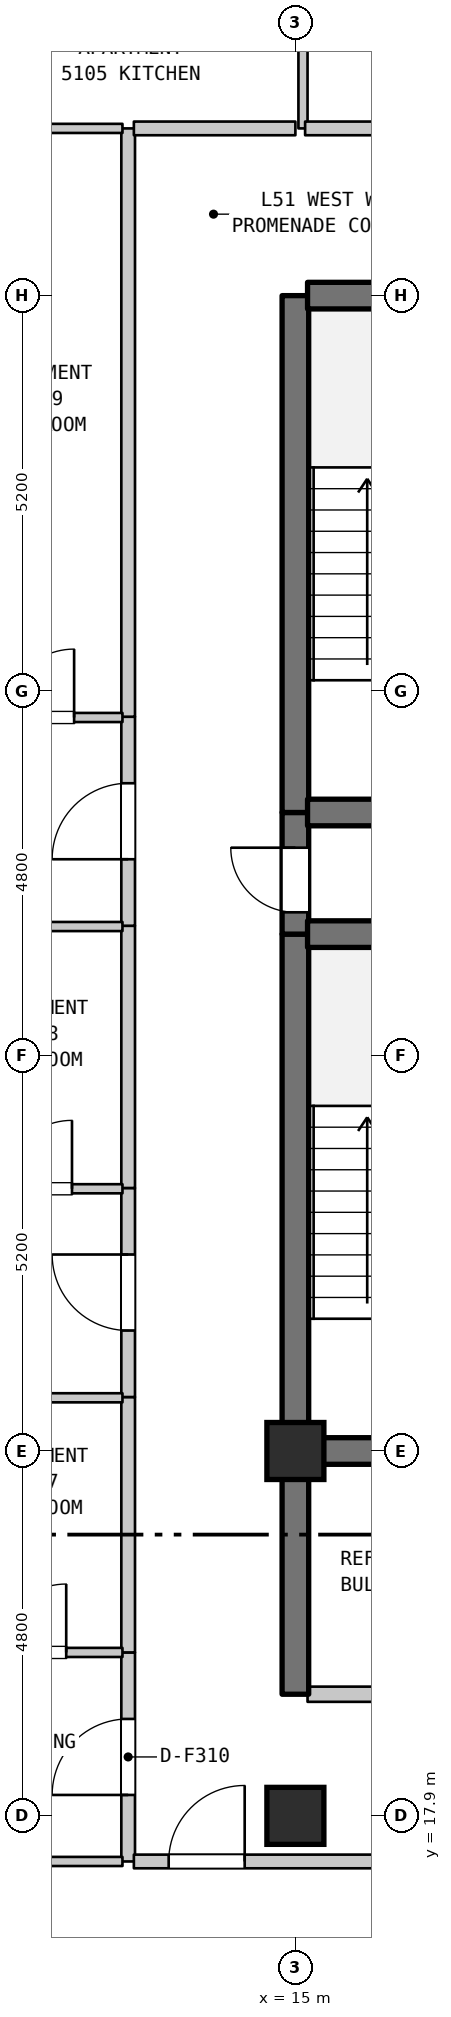
"""IFC4 building model, lengths in metres.
Left out: names, types, materials, properties, quantities, classifications, styles, units other than length and angle.
Written with IfcOpenShell. Run it as: python <this file> out.ifc"""

import sys

from ifc_helpers import new_model, si_unit, direction, frame, frame_2d, origin, origin_2d, place, context, subcontext, project, spatial, rectangle, extrude, element, fill, save


model = new_model("IFC4")
c1 = context("Model", 3, precision=1e-05, world=origin(), true_north=direction((0.0, 1.0)))
c2 = subcontext(c1, "Body", "Model", "MODEL_VIEW")
j1 = project(units=[si_unit("LENGTHUNIT", "METRE"), si_unit("PLANEANGLEUNIT", "RADIAN")], contexts=[c1])
p1 = place(None, origin())
s1 = spatial("IfcSite", under=j1, at=p1, CompositionType="ELEMENT")
p2 = place(p1, origin())
s2 = spatial("IfcBuilding", under=s1, at=p2, CompositionType="ELEMENT")
p3 = place(p2, frame((0.0, 0.0, 206.9)))
s3 = spatial("IfcBuildingStorey", under=s2, at=p3, CompositionType="ELEMENT", Elevation=206.9)
for number, where, z_axis, x_axis in (
    (1, (15.0, 17.9, 0.0), (0.0, 0.0, 1.0), (1.0, 0.0, 0.0)),
    (2, (15.0, 22.7, 0.0), (0.0, 0.0, 1.0), (1.0, 0.0, 0.0)),
):
    element("IfcColumn", number, at=place(p3, frame(where, z_axis=z_axis, x_axis=x_axis)), inside=s3, PredefinedType="COLUMN", context=c2, shape_type="SweptSolid", body=[
        extrude(rectangle(XDim=0.75, YDim=0.75, at=origin_2d()), origin(), (0.0, 0.0, 1.0), 3.7),
    ])
p4 = place(p3, frame((12.8, 17.3, 0.0), z_axis=(0.0, 0.0, 1.0), x_axis=(0.0, 1.0, 0.0)))
e3 = element("IfcWall", 3, at=p4, inside=s3, PredefinedType="STANDARD", context=c2, shape_type="SweptSolid", body=[
    extrude(rectangle(XDim=2.75, YDim=0.18, at=frame_2d((1.375, 0.0))), origin(), (0.0, 0.0, 1.0), 3.39),
])
p5 = place(p4, frame((0.875, 0.0, 0.0)))
e4 = element("IfcOpeningElement", 4, at=p5, cuts=e3, PredefinedType="OPENING", context=c2, shape_type="SweptSolid", body=[
    extrude(rectangle(XDim=1.0, YDim=2.15, at=frame_2d((0.5, 1.075))), frame((0.0, 0.1, 0.0), z_axis=(0.0, -1.0, 0.0), x_axis=(1.0, 0.0, 0.0)), (0.0, 0.0, 1.0), 0.2),
])
p6 = place(p3, frame((12.8, 20.05, 0.0), z_axis=(0.0, 0.0, 1.0), x_axis=(0.0, 1.0, 0.0)))
e5 = element("IfcWall", 5, at=p6, inside=s3, PredefinedType="STANDARD", context=c2, shape_type="SweptSolid", body=[
    extrude(rectangle(XDim=3.36, YDim=0.18, at=frame_2d((1.68, 0.0))), origin(), (0.0, 0.0, 1.0), 3.39),
])
p7 = place(p3, frame((12.8, 23.41, 0.0), z_axis=(0.0, 0.0, 1.0), x_axis=(0.0, 1.0, 0.0)))
e6 = element("IfcWall", 6, at=p7, inside=s3, PredefinedType="STANDARD", context=c2, shape_type="SweptSolid", body=[
    extrude(rectangle(XDim=2.75, YDim=0.18, at=frame_2d((1.375, 0.0))), origin(), (0.0, 0.0, 1.0), 3.39),
])
p8 = place(p7, frame((0.875, 0.0, 0.0)))
e7 = element("IfcOpeningElement", 7, at=p8, cuts=e6, PredefinedType="OPENING", context=c2, shape_type="SweptSolid", body=[
    extrude(rectangle(XDim=1.0, YDim=2.15, at=frame_2d((0.5, 1.075))), frame((0.0, 0.1, 0.0), z_axis=(0.0, -1.0, 0.0), x_axis=(1.0, 0.0, 0.0)), (0.0, 0.0, 1.0), 0.2),
])
p9 = place(p3, frame((12.8, 26.16, 0.0), z_axis=(0.0, 0.0, 1.0), x_axis=(0.0, 1.0, 0.0)))
e8 = element("IfcWall", 8, at=p9, inside=s3, PredefinedType="STANDARD", context=c2, shape_type="SweptSolid", body=[
    extrude(rectangle(XDim=3.45, YDim=0.18, at=frame_2d((1.725, 0.0))), origin(), (0.0, 0.0, 1.0), 3.39),
])
p10 = place(p3, frame((12.8, 29.61, 0.0), z_axis=(0.0, 0.0, 1.0), x_axis=(0.0, 1.0, 0.0)))
e9 = element("IfcWall", 9, at=p10, inside=s3, PredefinedType="STANDARD", context=c2, shape_type="SweptSolid", body=[
    extrude(rectangle(XDim=2.75, YDim=0.18, at=frame_2d((1.375, 0.0))), origin(), (0.0, 0.0, 1.0), 3.39),
])
p11 = place(p10, frame((0.875, 0.0, 0.0)))
e10 = element("IfcOpeningElement", 10, at=p11, cuts=e9, PredefinedType="OPENING", context=c2, shape_type="SweptSolid", body=[
    extrude(rectangle(XDim=1.0, YDim=2.15, at=frame_2d((0.5, 1.075))), frame((0.0, 0.1, 0.0), z_axis=(0.0, -1.0, 0.0), x_axis=(1.0, 0.0, 0.0)), (0.0, 0.0, 1.0), 0.2),
])
p12 = place(p3, frame((12.8, 32.36, 0.0), z_axis=(0.0, 0.0, 1.0), x_axis=(0.0, 1.0, 0.0)))
e11 = element("IfcWall", 11, at=p12, inside=s3, PredefinedType="STANDARD", context=c2, shape_type="SweptSolid", body=[
    extrude(rectangle(XDim=7.74, YDim=0.18, at=frame_2d((3.87, 0.0))), origin(), (0.0, 0.0, 1.0), 3.39),
])
p13 = place(p3, frame((15.0, 19.5, 0.0), z_axis=(0.0, 0.0, 1.0), x_axis=(0.0, 1.0, 0.0)))
e12 = element("IfcWall", 12, at=p13, inside=s3, PredefinedType="SHEAR", context=c2, shape_type="SweptSolid", body=[
    extrude(rectangle(XDim=3.2, YDim=0.35, at=frame_2d((1.6, 0.0))), origin(), (0.0, 0.0, 1.0), 3.39),
])
p14 = place(p3, frame((15.0, 22.7, 0.0), z_axis=(0.0, 0.0, 1.0), x_axis=(0.0, 1.0, 0.0)))
e13 = element("IfcWall", 13, at=p14, inside=s3, PredefinedType="SHEAR", context=c2, shape_type="SweptSolid", body=[
    extrude(rectangle(XDim=6.8, YDim=0.35, at=frame_2d((3.4, 0.0))), origin(), (0.0, 0.0, 1.0), 3.39),
])
p15 = place(p3, frame((15.0, 29.5, 0.0), z_axis=(0.0, 0.0, 1.0), x_axis=(0.0, 1.0, 0.0)))
e14 = element("IfcWall", 14, at=p15, inside=s3, PredefinedType="SHEAR", context=c2, shape_type="SweptSolid", body=[
    extrude(rectangle(XDim=1.6, YDim=0.35, at=frame_2d((0.8, 0.0))), origin(), (0.0, 0.0, 1.0), 3.39),
])
p16 = place(p15, frame((0.287, 0.0, 0.0)))
e15 = element("IfcOpeningElement", 15, at=p16, cuts=e14, PredefinedType="OPENING", context=c2, shape_type="SweptSolid", body=[
    extrude(rectangle(XDim=0.85, YDim=2.1, at=frame_2d((0.425, 1.05))), frame((0.0, 0.185, 0.0), z_axis=(0.0, -1.0, 0.0), x_axis=(1.0, 0.0, 0.0)), (0.0, 0.0, 1.0), 0.37),
])
p17 = place(p3, frame((15.0, 31.1, 0.0), z_axis=(0.0, 0.0, 1.0), x_axis=(0.0, 1.0, 0.0)))
e16 = element("IfcWall", 16, at=p17, inside=s3, PredefinedType="SHEAR", context=c2, shape_type="SweptSolid", body=[
    extrude(rectangle(XDim=6.8, YDim=0.35, at=frame_2d((3.4, 0.0))), origin(), (0.0, 0.0, 1.0), 3.39),
])
p18 = place(p3, frame((15.1, 40.1, 0.0), z_axis=(0.0, 0.0, 1.0), x_axis=(0.0, 1.0, 0.0)))
e17 = element("IfcWall", 17, at=p18, inside=s3, PredefinedType="PARTITIONING", context=c2, shape_type="SweptSolid", body=[
    extrude(rectangle(XDim=2.3, YDim=0.12, at=frame_2d((1.15, 0.0))), origin(), (0.0, 0.0, 1.0), 3.39),
])
p19 = place(p3, frame((9.085, 17.3, 0.0), z_axis=(0.0, 0.0, 1.0), x_axis=(1.0, 0.0, 0.0)))
e18 = element("IfcWall", 18, at=p19, inside=s3, PredefinedType="PARTITIONING", context=c2, shape_type="SweptSolid", body=[
    extrude(rectangle(XDim=3.64, YDim=0.12, at=frame_2d((1.82, 0.0))), origin(), (0.0, 0.0, 1.0), 3.39),
])
p20 = place(p3, frame((12.875, 17.3, 0.0), z_axis=(0.0, 0.0, 1.0), x_axis=(1.0, 0.0, 0.0)))
e19 = element("IfcWall", 19, at=p20, inside=s3, PredefinedType="STANDARD", context=c2, shape_type="SweptSolid", body=[
    extrude(rectangle(XDim=3.78, YDim=0.18, at=frame_2d((1.89, 0.0))), origin(), (0.0, 0.0, 1.0), 3.39),
])
p21 = place(p20, frame((0.458, 0.0, 0.0)))
e20 = element("IfcOpeningElement", 20, at=p21, cuts=e19, PredefinedType="OPENING", context=c2, shape_type="SweptSolid", body=[
    extrude(rectangle(XDim=1.0, YDim=2.15, at=frame_2d((0.5, 1.075))), frame((0.0, 0.1, 0.0), z_axis=(0.0, -1.0, 0.0), x_axis=(1.0, 0.0, 0.0)), (0.0, 0.0, 1.0), 0.2),
])
p22 = place(p3, frame((15.16, 19.5, 0.0), z_axis=(0.0, 0.0, 1.0), x_axis=(1.0, 0.0, 0.0)))
e21 = element("IfcWall", 21, at=p22, inside=s3, PredefinedType="STANDARD", context=c2, shape_type="SweptSolid", body=[
    extrude(rectangle(XDim=3.68, YDim=0.2, at=frame_2d((1.84, 0.0))), origin(), (0.0, 0.0, 1.0), 3.39),
])
p23 = place(p22, frame((1.39, 0.0, 0.0)))
e22 = element("IfcOpeningElement", 22, at=p23, cuts=e21, PredefinedType="OPENING", context=c2, shape_type="SweptSolid", body=[
    extrude(rectangle(XDim=0.9, YDim=2.15, at=frame_2d((0.45, 1.075))), frame((0.0, 0.11, 0.0), z_axis=(0.0, -1.0, 0.0), x_axis=(1.0, 0.0, 0.0)), (0.0, 0.0, 1.0), 0.22),
])
p24 = place(p3, frame((10.456, 20.05, 0.0), z_axis=(0.0, 0.0, 1.0), x_axis=(1.0, 0.0, 0.0)))
e23 = element("IfcWall", 23, at=p24, inside=s3, PredefinedType="PARTITIONING", context=c2, shape_type="SweptSolid", body=[
    extrude(rectangle(XDim=2.269, YDim=0.12, at=frame_2d((1.135, 0.0))), origin(), (0.0, 0.0, 1.0), 3.39),
])
p25 = place(p24, frame((0.629, 0.0, 0.0)))
e24 = element("IfcOpeningElement", 24, at=p25, cuts=e23, PredefinedType="OPENING", context=c2, shape_type="SweptSolid", body=[
    extrude(rectangle(XDim=0.9, YDim=2.1, at=frame_2d((0.45, 1.05))), frame((0.0, 0.07, 0.0), z_axis=(0.0, -1.0, 0.0), x_axis=(1.0, 0.0, 0.0)), (0.0, 0.0, 1.0), 0.14),
])
p26 = place(p3, frame((15.16, 22.7, 0.0), z_axis=(0.0, 0.0, 1.0), x_axis=(1.0, 0.0, 0.0)))
e25 = element("IfcWall", 25, at=p26, inside=s3, PredefinedType="SHEAR", context=c2, shape_type="SweptSolid", body=[
    extrude(rectangle(XDim=3.68, YDim=0.35, at=frame_2d((1.84, 0.0))), origin(), (0.0, 0.0, 1.0), 3.39),
])
p27 = place(p3, frame((10.456, 23.4, 0.0), z_axis=(0.0, 0.0, 1.0), x_axis=(1.0, 0.0, 0.0)))
e26 = element("IfcWall", 26, at=p27, inside=s3, PredefinedType="PARTITIONING", context=c2, shape_type="SweptSolid", body=[
    extrude(rectangle(XDim=2.269, YDim=0.12, at=frame_2d((1.135, 0.0))), origin(), (0.0, 0.0, 1.0), 3.39),
])
p28 = place(p3, frame((10.466, 26.15, 0.0), z_axis=(0.0, 0.0, 1.0), x_axis=(1.0, 0.0, 0.0)))
e27 = element("IfcWall", 27, at=p28, inside=s3, PredefinedType="PARTITIONING", context=c2, shape_type="SweptSolid", body=[
    extrude(rectangle(XDim=2.259, YDim=0.12, at=frame_2d((1.129, 0.0))), origin(), (0.0, 0.0, 1.0), 3.39),
])
p29 = place(p28, frame((0.695, 0.0, 0.0)))
e28 = element("IfcOpeningElement", 28, at=p29, cuts=e27, PredefinedType="OPENING", context=c2, shape_type="SweptSolid", body=[
    extrude(rectangle(XDim=0.9, YDim=2.1, at=frame_2d((0.45, 1.05))), frame((0.0, 0.07, 0.0), z_axis=(0.0, -1.0, 0.0), x_axis=(1.0, 0.0, 0.0)), (0.0, 0.0, 1.0), 0.14),
])
p30 = place(p3, frame((15.16, 29.5, 0.0), z_axis=(0.0, 0.0, 1.0), x_axis=(1.0, 0.0, 0.0)))
e29 = element("IfcWall", 29, at=p30, inside=s3, PredefinedType="SHEAR", context=c2, shape_type="SweptSolid", body=[
    extrude(rectangle(XDim=3.68, YDim=0.35, at=frame_2d((1.84, 0.0))), origin(), (0.0, 0.0, 1.0), 3.39),
])
p31 = place(p3, frame((10.466, 29.6, 0.0), z_axis=(0.0, 0.0, 1.0), x_axis=(1.0, 0.0, 0.0)))
e30 = element("IfcWall", 30, at=p31, inside=s3, PredefinedType="PARTITIONING", context=c2, shape_type="SweptSolid", body=[
    extrude(rectangle(XDim=2.259, YDim=0.12, at=frame_2d((1.129, 0.0))), origin(), (0.0, 0.0, 1.0), 3.39),
])
p32 = place(p3, frame((15.16, 31.1, 0.0), z_axis=(0.0, 0.0, 1.0), x_axis=(1.0, 0.0, 0.0)))
e31 = element("IfcWall", 31, at=p32, inside=s3, PredefinedType="SHEAR", context=c2, shape_type="SweptSolid", body=[
    extrude(rectangle(XDim=3.68, YDim=0.35, at=frame_2d((1.84, 0.0))), origin(), (0.0, 0.0, 1.0), 3.39),
])
p33 = place(p3, frame((10.523, 32.35, 0.0), z_axis=(0.0, 0.0, 1.0), x_axis=(1.0, 0.0, 0.0)))
e32 = element("IfcWall", 32, at=p33, inside=s3, PredefinedType="PARTITIONING", context=c2, shape_type="SweptSolid", body=[
    extrude(rectangle(XDim=2.202, YDim=0.12, at=frame_2d((1.101, 0.0))), origin(), (0.0, 0.0, 1.0), 3.39),
])
p34 = place(p33, frame((0.666, 0.0, 0.0)))
e33 = element("IfcOpeningElement", 33, at=p34, cuts=e32, PredefinedType="OPENING", context=c2, shape_type="SweptSolid", body=[
    extrude(rectangle(XDim=0.9, YDim=2.1, at=frame_2d((0.45, 1.05))), frame((0.0, 0.07, 0.0), z_axis=(0.0, -1.0, 0.0), x_axis=(1.0, 0.0, 0.0)), (0.0, 0.0, 1.0), 0.14),
])
p35 = place(p3, frame((15.16, 37.9, 0.0), z_axis=(0.0, 0.0, 1.0), x_axis=(1.0, 0.0, 0.0)))
e34 = element("IfcWall", 34, at=p35, inside=s3, PredefinedType="SHEAR", context=c2, shape_type="SweptSolid", body=[
    extrude(rectangle(XDim=3.68, YDim=0.35, at=frame_2d((1.84, 0.0))), origin(), (0.0, 0.0, 1.0), 3.39),
])
p36 = place(p3, frame((11.724, 40.1, 0.0), z_axis=(0.0, 0.0, 1.0), x_axis=(1.0, 0.0, 0.0)))
e35 = element("IfcWall", 35, at=p36, inside=s3, PredefinedType="PARTITIONING", context=c2, shape_type="SweptSolid", body=[
    extrude(rectangle(XDim=1.001, YDim=0.12, at=frame_2d((0.5, 0.0))), origin(), (0.0, 0.0, 1.0), 3.39),
])
p37 = place(p3, frame((12.875, 40.1, 0.0), z_axis=(0.0, 0.0, 1.0), x_axis=(1.0, 0.0, 0.0)))
e36 = element("IfcWall", 36, at=p37, inside=s3, PredefinedType="STANDARD", context=c2, shape_type="SweptSolid", body=[
    extrude(rectangle(XDim=2.125, YDim=0.18, at=frame_2d((1.062, 0.0))), origin(), (0.0, 0.0, 1.0), 3.39),
])
p38 = place(p3, frame((15.128, 40.1, 0.0), z_axis=(0.0, 0.0, 1.0), x_axis=(1.0, 0.0, 0.0)))
e37 = element("IfcWall", 37, at=p38, inside=s3, PredefinedType="STANDARD", context=c2, shape_type="SweptSolid", body=[
    extrude(rectangle(XDim=3.907, YDim=0.18, at=frame_2d((1.954, 0.0))), origin(), (0.0, 0.0, 1.0), 3.39),
])
p39 = place(p5, origin())
e38 = element("IfcDoor", 38, at=p39, inside=s3, OperationType="SINGLE_SWING_LEFT", PredefinedType="DOOR", context=c2, shape_type="SweptSolid", body=[
    extrude(rectangle(XDim=1.0, YDim=2.15, at=frame_2d((0.5, 1.075))), frame((0.0, 0.025, 0.0), z_axis=(0.0, -1.0, 0.0), x_axis=(1.0, 0.0, 0.0)), (0.0, 0.0, 1.0), 0.05),
])
fill(e4, e38)
p40 = place(p8, origin())
e39 = element("IfcDoor", 39, at=p40, inside=s3, OperationType="SINGLE_SWING_RIGHT", PredefinedType="DOOR", context=c2, shape_type="SweptSolid", body=[
    extrude(rectangle(XDim=1.0, YDim=2.15, at=frame_2d((0.5, 1.075))), frame((0.0, 0.025, 0.0), z_axis=(0.0, -1.0, 0.0), x_axis=(1.0, 0.0, 0.0)), (0.0, 0.0, 1.0), 0.05),
])
fill(e7, e39)
p41 = place(p11, origin())
e40 = element("IfcDoor", 40, at=p41, inside=s3, OperationType="SINGLE_SWING_LEFT", PredefinedType="DOOR", context=c2, shape_type="SweptSolid", body=[
    extrude(rectangle(XDim=1.0, YDim=2.15, at=frame_2d((0.5, 1.075))), frame((0.0, 0.025, 0.0), z_axis=(0.0, -1.0, 0.0), x_axis=(1.0, 0.0, 0.0)), (0.0, 0.0, 1.0), 0.05),
])
fill(e10, e40)
p42 = place(p16, origin())
e41 = element("IfcDoor", 41, at=p42, inside=s3, OperationType="SINGLE_SWING_RIGHT", PredefinedType="DOOR", context=c2, shape_type="SweptSolid", body=[
    extrude(rectangle(XDim=0.85, YDim=2.1, at=frame_2d((0.425, 1.05))), frame((0.0, 0.025, 0.0), z_axis=(0.0, -1.0, 0.0), x_axis=(1.0, 0.0, 0.0)), (0.0, 0.0, 1.0), 0.05),
])
fill(e15, e41)
p43 = place(p21, origin())
e42 = element("IfcDoor", 42, at=p43, inside=s3, OperationType="SINGLE_SWING_RIGHT", PredefinedType="DOOR", context=c2, shape_type="SweptSolid", body=[
    extrude(rectangle(XDim=1.0, YDim=2.15, at=frame_2d((0.5, 1.075))), frame((0.0, 0.025, 0.0), z_axis=(0.0, -1.0, 0.0), x_axis=(1.0, 0.0, 0.0)), (0.0, 0.0, 1.0), 0.05),
])
fill(e20, e42)
p44 = place(p25, origin())
e43 = element("IfcDoor", 43, at=p44, inside=s3, OperationType="SINGLE_SWING_RIGHT", PredefinedType="DOOR", context=c2, shape_type="SweptSolid", body=[
    extrude(rectangle(XDim=0.9, YDim=2.1, at=frame_2d((0.45, 1.05))), frame((0.0, 0.025, 0.0), z_axis=(0.0, -1.0, 0.0), x_axis=(1.0, 0.0, 0.0)), (0.0, 0.0, 1.0), 0.05),
])
fill(e24, e43)
p45 = place(p29, origin())
e44 = element("IfcDoor", 44, at=p45, inside=s3, OperationType="SINGLE_SWING_RIGHT", PredefinedType="DOOR", context=c2, shape_type="SweptSolid", body=[
    extrude(rectangle(XDim=0.9, YDim=2.1, at=frame_2d((0.45, 1.05))), frame((0.0, 0.025, 0.0), z_axis=(0.0, -1.0, 0.0), x_axis=(1.0, 0.0, 0.0)), (0.0, 0.0, 1.0), 0.05),
])
fill(e28, e44)
p46 = place(p34, origin())
e45 = element("IfcDoor", 45, at=p46, inside=s3, OperationType="SINGLE_SWING_RIGHT", PredefinedType="DOOR", context=c2, shape_type="SweptSolid", body=[
    extrude(rectangle(XDim=0.9, YDim=2.1, at=frame_2d((0.45, 1.05))), frame((0.0, 0.025, 0.0), z_axis=(0.0, -1.0, 0.0), x_axis=(1.0, 0.0, 0.0)), (0.0, 0.0, 1.0), 0.05),
])
fill(e33, e45)
save(model, sys.argv[1])
